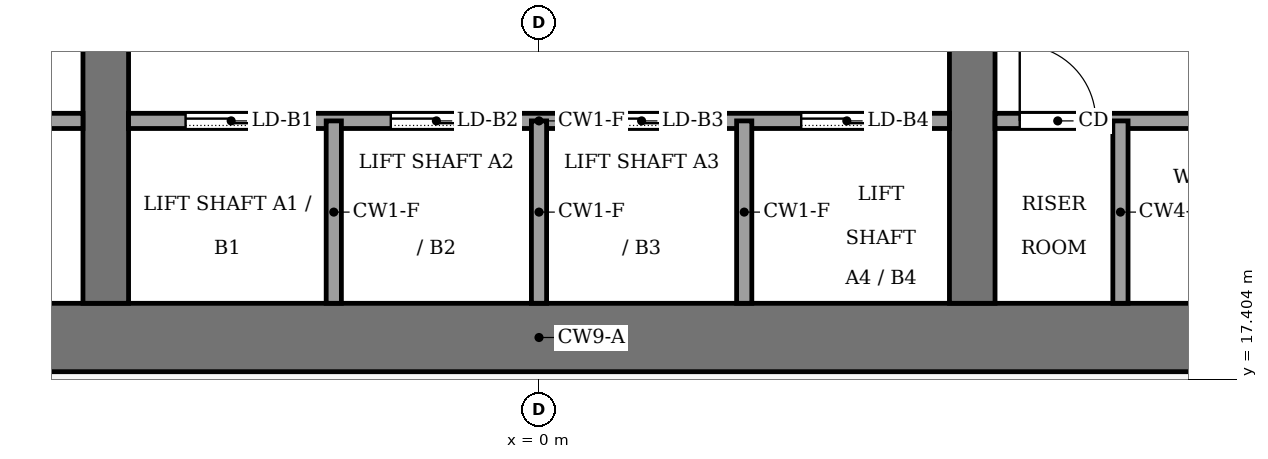
"""IFC4 building model, lengths in metres.
Left out: names, types, materials, properties, quantities, classifications, styles, units other than length and angle.
Written with IfcOpenShell. Run it as: python <this file> out.ifc"""

import sys

from ifc_helpers import new_model, si_unit, direction, frame, frame_2d, origin, place, context, subcontext, project, spatial, rectangle, extrude, element, fill, save


model = new_model("IFC4")
c1 = context("Model", 3, precision=1e-05, world=origin(), true_north=direction((0.0, 1.0)))
c2 = subcontext(c1, "Body", "Model", "MODEL_VIEW")
j1 = project(units=[si_unit("LENGTHUNIT", "METRE"), si_unit("PLANEANGLEUNIT", "RADIAN")], contexts=[c1])
p1 = place(None, origin())
s1 = spatial("IfcSite", under=j1, at=p1, CompositionType="ELEMENT")
p2 = place(p1, origin())
s2 = spatial("IfcBuilding", under=s1, at=p2, CompositionType="ELEMENT")
p3 = place(p2, frame((0.0, 0.0, 182.0)))
s3 = spatial("IfcBuildingStorey", under=s2, at=p3, CompositionType="ELEMENT", Elevation=182.0)
p4 = place(p3, frame((-13.5, 17.95, -0.13), z_axis=(0.0, 0.0, 1.0), x_axis=(1.0, 0.0, 0.0)))
e1 = element("IfcWall", 1, at=p4, inside=s3, PredefinedType="SHEAR", context=c2, shape_type="SweptSolid", body=[
    extrude(rectangle(XDim=27.0, YDim=0.9, at=frame_2d((13.5, 0.0))), origin(), (0.0, 0.0, 1.0), 4.0),
])
p5 = place(p3, frame((-5.7, 18.4, -0.13), z_axis=(0.0, 0.0, 1.0), x_axis=(0.0, 1.0, 0.0)))
e2 = element("IfcWall", 2, at=p5, inside=s3, PredefinedType="SHEAR", context=c2, shape_type="SweptSolid", body=[
    extrude(rectangle(XDim=19.2, YDim=0.6, at=frame_2d((9.6, 0.0))), origin(), (0.0, 0.0, 1.0), 4.0),
])
p6 = place(p5, frame((8.35, 0.0, 0.13)))
e3 = element("IfcOpeningElement", 3, at=p6, cuts=e2, PredefinedType="OPENING", context=c2, shape_type="SweptSolid", body=[
    extrude(rectangle(XDim=0.9, YDim=2.1, at=frame_2d((0.45, 1.05))), frame((0.0, 0.31, 0.0), z_axis=(0.0, -1.0, 0.0), x_axis=(1.0, 0.0, 0.0)), (0.0, 0.0, 1.0), 0.62),
])
p7 = place(p3, frame((5.7, 18.4, -0.13), z_axis=(0.0, 0.0, 1.0), x_axis=(0.0, 1.0, 0.0)))
e4 = element("IfcWall", 4, at=p7, inside=s3, PredefinedType="SHEAR", context=c2, shape_type="SweptSolid", body=[
    extrude(rectangle(XDim=19.2, YDim=0.6, at=frame_2d((9.6, 0.0))), origin(), (0.0, 0.0, 1.0), 4.0),
])
p8 = place(p7, frame((13.3, 0.0, 0.13)))
e5 = element("IfcOpeningElement", 5, at=p8, cuts=e4, PredefinedType="OPENING", context=c2, shape_type="SweptSolid", body=[
    extrude(rectangle(XDim=2.4, YDim=2.4, at=frame_2d((1.2, 1.2))), frame((0.0, 0.31, 0.0), z_axis=(0.0, -1.0, 0.0), x_axis=(1.0, 0.0, 0.0)), (0.0, 0.0, 1.0), 0.62),
])
p9 = place(p3, frame((-12.6, 20.8, 0.0), z_axis=(0.0, 0.0, 1.0), x_axis=(1.0, 0.0, 0.0)))
e6 = element("IfcWall", 6, at=p9, inside=s3, PredefinedType="PARTITIONING", context=c2, shape_type="SweptSolid", body=[
    extrude(rectangle(XDim=6.6, YDim=0.2, at=frame_2d((3.3, 0.0))), origin(), (0.0, 0.0, 1.0), 3.87),
])
p10 = place(p9, frame((2.8, 0.0, 0.0)))
e7 = element("IfcOpeningElement", 7, at=p10, cuts=e6, PredefinedType="OPENING", context=c2, shape_type="SweptSolid", body=[
    extrude(rectangle(XDim=1.0, YDim=2.1, at=frame_2d((0.5, 1.05))), frame((0.0, 0.11, 0.0), z_axis=(0.0, -1.0, 0.0), x_axis=(1.0, 0.0, 0.0)), (0.0, 0.0, 1.0), 0.22),
])
p11 = place(p3, frame((-5.4, 20.8, 0.0), z_axis=(0.0, 0.0, 1.0), x_axis=(1.0, 0.0, 0.0)))
e8 = element("IfcWall", 8, at=p11, inside=s3, PredefinedType="PARTITIONING", context=c2, shape_type="SweptSolid", body=[
    extrude(rectangle(XDim=10.8, YDim=0.2, at=frame_2d((5.4, 0.0))), origin(), (0.0, 0.0, 1.0), 3.87),
])
p12 = place(p11, frame((0.75, 0.0, 0.0)))
e9 = element("IfcOpeningElement", 9, at=p12, cuts=e8, PredefinedType="OPENING", context=c2, shape_type="SweptSolid", body=[
    extrude(rectangle(XDim=1.2, YDim=2.2, at=frame_2d((0.6, 1.1))), frame((0.0, 0.11, 0.0), z_axis=(0.0, -1.0, 0.0), x_axis=(1.0, 0.0, 0.0)), (0.0, 0.0, 1.0), 0.22),
])
p13 = place(p11, frame((3.45, 0.0, 0.0)))
e10 = element("IfcOpeningElement", 10, at=p13, cuts=e8, PredefinedType="OPENING", context=c2, shape_type="SweptSolid", body=[
    extrude(rectangle(XDim=1.2, YDim=2.2, at=frame_2d((0.6, 1.1))), frame((0.0, 0.11, 0.0), z_axis=(0.0, -1.0, 0.0), x_axis=(1.0, 0.0, 0.0)), (0.0, 0.0, 1.0), 0.22),
])
p14 = place(p11, frame((6.15, 0.0, 0.0)))
e11 = element("IfcOpeningElement", 11, at=p14, cuts=e8, PredefinedType="OPENING", context=c2, shape_type="SweptSolid", body=[
    extrude(rectangle(XDim=1.2, YDim=2.2, at=frame_2d((0.6, 1.1))), frame((0.0, 0.11, 0.0), z_axis=(0.0, -1.0, 0.0), x_axis=(1.0, 0.0, 0.0)), (0.0, 0.0, 1.0), 0.22),
])
p15 = place(p11, frame((8.85, 0.0, 0.0)))
e12 = element("IfcOpeningElement", 12, at=p15, cuts=e8, PredefinedType="OPENING", context=c2, shape_type="SweptSolid", body=[
    extrude(rectangle(XDim=1.2, YDim=2.2, at=frame_2d((0.6, 1.1))), frame((0.0, 0.11, 0.0), z_axis=(0.0, -1.0, 0.0), x_axis=(1.0, 0.0, 0.0)), (0.0, 0.0, 1.0), 0.22),
])
p16 = place(p3, frame((6.0, 20.8, 0.0), z_axis=(0.0, 0.0, 1.0), x_axis=(1.0, 0.0, 0.0)))
e13 = element("IfcWall", 13, at=p16, inside=s3, PredefinedType="PARTITIONING", context=c2, shape_type="SweptSolid", body=[
    extrude(rectangle(XDim=6.6, YDim=0.2, at=frame_2d((3.3, 0.0))), origin(), (0.0, 0.0, 1.0), 3.87),
])
p17 = place(p16, frame((0.325, 0.0, 0.0)))
e14 = element("IfcOpeningElement", 14, at=p17, cuts=e13, PredefinedType="OPENING", context=c2, shape_type="SweptSolid", body=[
    extrude(rectangle(XDim=1.0, YDim=2.1, at=frame_2d((0.5, 1.05))), frame((0.0, 0.11, 0.0), z_axis=(0.0, -1.0, 0.0), x_axis=(1.0, 0.0, 0.0)), (0.0, 0.0, 1.0), 0.22),
])
p18 = place(p16, frame((2.8, 0.0, 0.0)))
e15 = element("IfcOpeningElement", 15, at=p18, cuts=e13, PredefinedType="OPENING", context=c2, shape_type="SweptSolid", body=[
    extrude(rectangle(XDim=1.0, YDim=2.1, at=frame_2d((0.5, 1.05))), frame((0.0, 0.11, 0.0), z_axis=(0.0, -1.0, 0.0), x_axis=(1.0, 0.0, 0.0)), (0.0, 0.0, 1.0), 0.22),
])
p19 = place(p16, frame((5.275, 0.0, 0.0)))
e16 = element("IfcOpeningElement", 16, at=p19, cuts=e13, PredefinedType="OPENING", context=c2, shape_type="SweptSolid", body=[
    extrude(rectangle(XDim=1.0, YDim=2.1, at=frame_2d((0.5, 1.05))), frame((0.0, 0.11, 0.0), z_axis=(0.0, -1.0, 0.0), x_axis=(1.0, 0.0, 0.0)), (0.0, 0.0, 1.0), 0.22),
])
for number, where, z_axis, x_axis in (
    (17, (-2.7, 18.4, 0.0), (0.0, 0.0, 1.0), (0.0, 1.0, 0.0)),
    (18, (0.0, 18.4, 0.0), (0.0, 0.0, 1.0), (0.0, 1.0, 0.0)),
    (19, (2.7, 18.4, 0.0), (0.0, 0.0, 1.0), (0.0, 1.0, 0.0)),
    (20, (7.65, 18.4, 0.0), (0.0, 0.0, 1.0), (0.0, 1.0, 0.0)),
):
    element("IfcWall", number, at=place(p3, frame(where, z_axis=z_axis, x_axis=x_axis)), inside=s3, PredefinedType="PARTITIONING", context=c2, shape_type="SweptSolid", body=[
        extrude(rectangle(XDim=2.4, YDim=0.2, at=frame_2d((1.2, 0.0))), origin(), (0.0, 0.0, 1.0), 3.87),
    ])
p20 = place(p12, origin())
e21 = element("IfcDoor", 21, at=p20, inside=s3, OperationType="SLIDING_TO_LEFT", PredefinedType="DOOR", context=c2, shape_type="SweptSolid", body=[
    extrude(rectangle(XDim=1.2, YDim=2.2, at=frame_2d((0.6, 1.1))), frame((0.0, 0.025, 0.0), z_axis=(0.0, -1.0, 0.0), x_axis=(1.0, 0.0, 0.0)), (0.0, 0.0, 1.0), 0.05),
])
fill(e9, e21)
p21 = place(p13, origin())
e22 = element("IfcDoor", 22, at=p21, inside=s3, OperationType="SLIDING_TO_LEFT", PredefinedType="DOOR", context=c2, shape_type="SweptSolid", body=[
    extrude(rectangle(XDim=1.2, YDim=2.2, at=frame_2d((0.6, 1.1))), frame((0.0, 0.025, 0.0), z_axis=(0.0, -1.0, 0.0), x_axis=(1.0, 0.0, 0.0)), (0.0, 0.0, 1.0), 0.05),
])
fill(e10, e22)
p22 = place(p14, origin())
e23 = element("IfcDoor", 23, at=p22, inside=s3, OperationType="SLIDING_TO_LEFT", PredefinedType="DOOR", context=c2, shape_type="SweptSolid", body=[
    extrude(rectangle(XDim=1.2, YDim=2.2, at=frame_2d((0.6, 1.1))), frame((0.0, 0.025, 0.0), z_axis=(0.0, -1.0, 0.0), x_axis=(1.0, 0.0, 0.0)), (0.0, 0.0, 1.0), 0.05),
])
fill(e11, e23)
p23 = place(p15, origin())
e24 = element("IfcDoor", 24, at=p23, inside=s3, OperationType="SLIDING_TO_LEFT", PredefinedType="DOOR", context=c2, shape_type="SweptSolid", body=[
    extrude(rectangle(XDim=1.2, YDim=2.2, at=frame_2d((0.6, 1.1))), frame((0.0, 0.025, 0.0), z_axis=(0.0, -1.0, 0.0), x_axis=(1.0, 0.0, 0.0)), (0.0, 0.0, 1.0), 0.05),
])
fill(e12, e24)
p24 = place(p17, origin())
e25 = element("IfcDoor", 25, at=p24, inside=s3, OperationType="SINGLE_SWING_LEFT", PredefinedType="DOOR", context=c2, shape_type="SweptSolid", body=[
    extrude(rectangle(XDim=1.0, YDim=2.1, at=frame_2d((0.5, 1.05))), frame((0.0, 0.025, 0.0), z_axis=(0.0, -1.0, 0.0), x_axis=(1.0, 0.0, 0.0)), (0.0, 0.0, 1.0), 0.05),
])
fill(e14, e25)
save(model, sys.argv[1])
